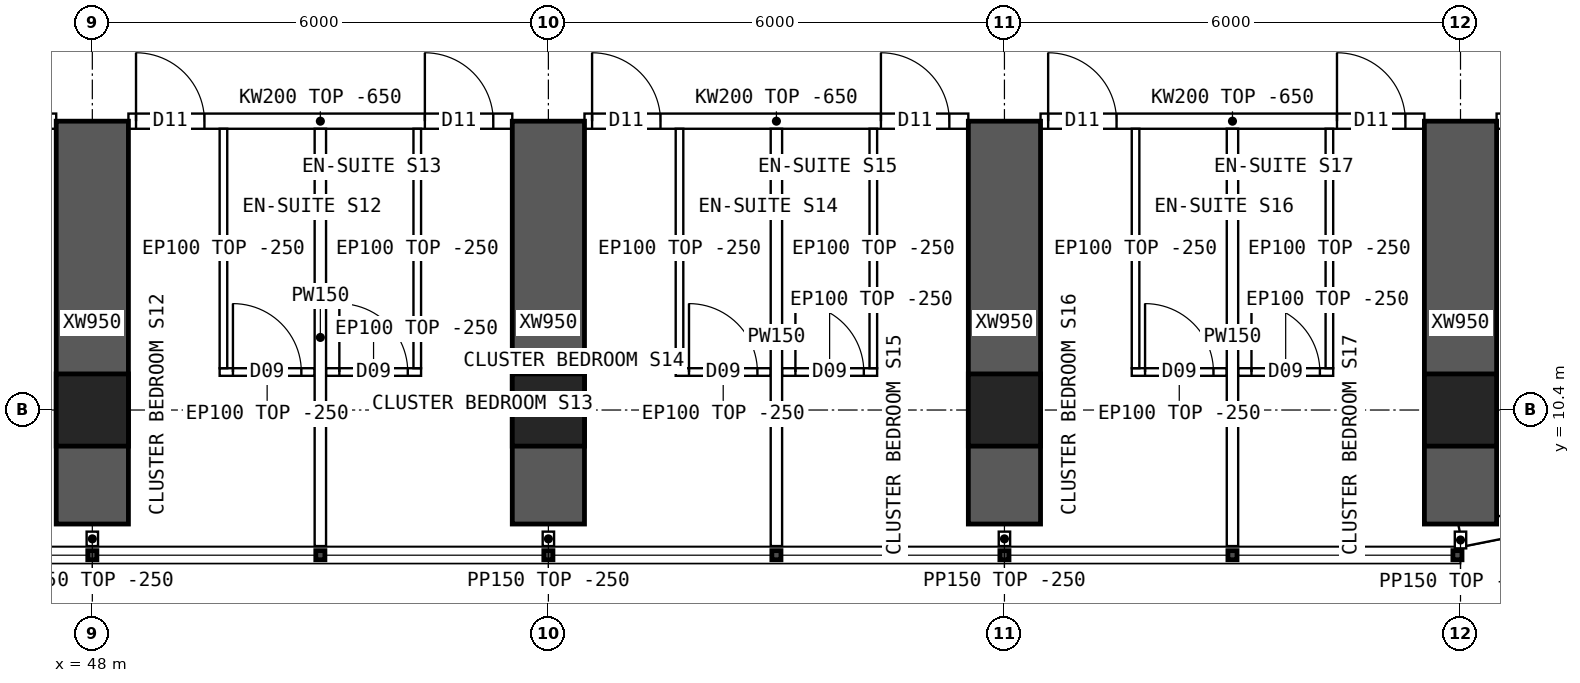
"""IFC4 building model, lengths in metres.
Left out: names, types, materials, properties, quantities, classifications, styles, units other than length and angle.
Written with IfcOpenShell. Run it as: python <this file> out.ifc"""

import sys

from ifc_helpers import new_model, si_unit, direction, frame, frame_2d, origin, origin_2d, place, context, subcontext, project, spatial, polyline, rectangle, hollow_rectangle, outline, extrude, element, fill, save


model = new_model("IFC4")
c1 = context("Model", 3, precision=1e-05, world=origin(), true_north=direction((0.0, 1.0)))
c2 = subcontext(c1, "Body", "Model", "MODEL_VIEW")
j1 = project(units=[si_unit("LENGTHUNIT", "METRE"), si_unit("PLANEANGLEUNIT", "RADIAN")], contexts=[c1])
p1 = place(None, origin())
s1 = spatial("IfcSite", under=j1, at=p1, CompositionType="ELEMENT")
p2 = place(p1, origin())
s2 = spatial("IfcBuilding", under=s1, at=p2, CompositionType="ELEMENT")
p3 = place(p2, frame((0.0, 0.0, 114.4)))
s3 = spatial("IfcBuildingStorey", under=s2, at=p3, CompositionType="ELEMENT", Elevation=114.4)
for number, where, z_axis, x_axis in (
    (1, (48.0, 10.4, 0.0), (0.0, 0.0, 1.0), (1.0, 0.0, 0.0)),
    (2, (54.0, 10.4, 0.0), (0.0, 0.0, 1.0), (1.0, 0.0, 0.0)),
    (3, (60.0, 10.4, 0.0), (0.0, 0.0, 1.0), (1.0, 0.0, 0.0)),
    (4, (66.0, 10.4, 0.0), (0.0, 0.0, 1.0), (1.0, 0.0, 0.0)),
):
    element("IfcColumn", number, at=place(p3, frame(where, z_axis=z_axis, x_axis=x_axis)), inside=s3, PredefinedType="COLUMN", context=c2, shape_type="SweptSolid", body=[
        extrude(hollow_rectangle(XDim=0.95, YDim=0.95, WallThickness=0.095, at=origin_2d()), origin(), (0.0, 0.0, 1.0), 3.75),
    ])
for number, where, z_axis, x_axis in (
    (5, (48.0, 8.9, 0.0), (0.0, 0.0, 1.0), (0.0, 1.0, 0.0)),
    (6, (54.0, 8.9, 0.0), (0.0, 0.0, 1.0), (0.0, 1.0, 0.0)),
    (7, (60.0, 8.9, 0.0), (0.0, 0.0, 1.0), (0.0, 1.0, 0.0)),
    (8, (66.0, 8.9, 0.0), (0.0, 0.0, 1.0), (0.0, 1.0, 0.0)),
):
    element("IfcWall", number, at=place(p3, frame(where, z_axis=z_axis, x_axis=x_axis)), inside=s3, PredefinedType="SHEAR", context=c2, shape_type="SweptSolid", body=[
        extrude(rectangle(XDim=5.3, YDim=0.95, at=frame_2d((2.65, 0.0))), origin(), (0.0, 0.0, 1.0), 3.75),
    ])
p4 = place(p3, frame((66.0, 8.75, 0.0), z_axis=(0.0, 0.0, 1.0), x_axis=(0.980791473772, 0.195059183267, 0.0)))
e9 = element("IfcWall", 9, at=p4, inside=s3, PredefinedType="SOLIDWALL", context=c2, shape_type="SweptSolid", body=[
    extrude(outline(polyline([(-0.03, -0.15), (3.717, -0.15), (3.657, 0.15), (0.03, 0.15), (-0.03, -0.15)])), origin(), (0.0, 0.0, 1.0), 3.5),
])
p5 = place(p4, frame((1.144, 0.0, 0.9)))
e10 = element("IfcOpeningElement", 10, at=p5, cuts=e9, PredefinedType="OPENING", context=c2, shape_type="SweptSolid", body=[
    extrude(rectangle(XDim=1.4, YDim=1.8, at=frame_2d((0.7, 0.9))), frame((0.0, 0.16, 0.0), z_axis=(0.0, -1.0, 0.0), x_axis=(1.0, 0.0, 0.0)), (0.0, 0.0, 1.0), 0.32),
])
p6 = place(p3, frame((42.475, 14.2, 0.0), z_axis=(0.0, 0.0, 1.0), x_axis=(1.0, 0.0, 0.0)))
e11 = element("IfcWall", 11, at=p6, inside=s3, PredefinedType="SOLIDWALL", context=c2, shape_type="SweptSolid", body=[
    extrude(outline(polyline([(0.0, 0.0), (5.05, 0.0), (5.05, 3.1), (0.0, 3.1), (0.0, 0.0)])), frame((0.0, 0.1, 0.0), z_axis=(0.0, -1.0, 0.0), x_axis=(1.0, 0.0, 0.0)), (0.0, 0.0, 1.0), 0.2),
])
p7 = place(p6, frame((0.6, 0.0, 0.0)))
e12 = element("IfcOpeningElement", 12, at=p7, cuts=e11, PredefinedType="OPENING", context=c2, shape_type="SweptSolid", body=[
    extrude(rectangle(XDim=1.0, YDim=2.1, at=frame_2d((0.5, 1.05))), frame((0.0, 0.11, 0.0), z_axis=(0.0, -1.0, 0.0), x_axis=(1.0, 0.0, 0.0)), (0.0, 0.0, 1.0), 0.22),
])
p8 = place(p3, frame((48.475, 14.2, 0.0), z_axis=(0.0, 0.0, 1.0), x_axis=(1.0, 0.0, 0.0)))
e13 = element("IfcWall", 13, at=p8, inside=s3, PredefinedType="SOLIDWALL", context=c2, shape_type="SweptSolid", body=[
    extrude(outline(polyline([(0.0, 0.0), (5.05, 0.0), (5.05, 3.1), (0.0, 3.1), (0.0, 0.0)])), frame((0.0, 0.1, 0.0), z_axis=(0.0, -1.0, 0.0), x_axis=(1.0, 0.0, 0.0)), (0.0, 0.0, 1.0), 0.2),
])
p9 = place(p8, frame((0.1, 0.0, 0.0)))
e14 = element("IfcOpeningElement", 14, at=p9, cuts=e13, PredefinedType="OPENING", context=c2, shape_type="SweptSolid", body=[
    extrude(rectangle(XDim=0.9, YDim=2.1, at=frame_2d((0.45, 1.05))), frame((0.0, 0.11, 0.0), z_axis=(0.0, -1.0, 0.0), x_axis=(1.0, 0.0, 0.0)), (0.0, 0.0, 1.0), 0.22),
])
p10 = place(p8, frame((3.9, 0.0, 0.0)))
e15 = element("IfcOpeningElement", 15, at=p10, cuts=e13, PredefinedType="OPENING", context=c2, shape_type="SweptSolid", body=[
    extrude(rectangle(XDim=0.9, YDim=2.1, at=frame_2d((0.45, 1.05))), frame((0.0, 0.11, 0.0), z_axis=(0.0, -1.0, 0.0), x_axis=(1.0, 0.0, 0.0)), (0.0, 0.0, 1.0), 0.22),
])
p11 = place(p3, frame((54.475, 14.2, 0.0), z_axis=(0.0, 0.0, 1.0), x_axis=(1.0, 0.0, 0.0)))
e16 = element("IfcWall", 16, at=p11, inside=s3, PredefinedType="SOLIDWALL", context=c2, shape_type="SweptSolid", body=[
    extrude(outline(polyline([(0.0, 0.0), (5.05, 0.0), (5.05, 3.1), (0.0, 3.1), (0.0, 0.0)])), frame((0.0, 0.1, 0.0), z_axis=(0.0, -1.0, 0.0), x_axis=(1.0, 0.0, 0.0)), (0.0, 0.0, 1.0), 0.2),
])
p12 = place(p11, frame((0.1, 0.0, 0.0)))
e17 = element("IfcOpeningElement", 17, at=p12, cuts=e16, PredefinedType="OPENING", context=c2, shape_type="SweptSolid", body=[
    extrude(rectangle(XDim=0.9, YDim=2.1, at=frame_2d((0.45, 1.05))), frame((0.0, 0.11, 0.0), z_axis=(0.0, -1.0, 0.0), x_axis=(1.0, 0.0, 0.0)), (0.0, 0.0, 1.0), 0.22),
])
p13 = place(p11, frame((3.9, 0.0, 0.0)))
e18 = element("IfcOpeningElement", 18, at=p13, cuts=e16, PredefinedType="OPENING", context=c2, shape_type="SweptSolid", body=[
    extrude(rectangle(XDim=0.9, YDim=2.1, at=frame_2d((0.45, 1.05))), frame((0.0, 0.11, 0.0), z_axis=(0.0, -1.0, 0.0), x_axis=(1.0, 0.0, 0.0)), (0.0, 0.0, 1.0), 0.22),
])
p14 = place(p3, frame((60.475, 14.2, 0.0), z_axis=(0.0, 0.0, 1.0), x_axis=(1.0, 0.0, 0.0)))
e19 = element("IfcWall", 19, at=p14, inside=s3, PredefinedType="SOLIDWALL", context=c2, shape_type="SweptSolid", body=[
    extrude(outline(polyline([(0.0, 0.0), (5.05, 0.0), (5.05, 3.1), (0.0, 3.1), (0.0, 0.0)])), frame((0.0, 0.1, 0.0), z_axis=(0.0, -1.0, 0.0), x_axis=(1.0, 0.0, 0.0)), (0.0, 0.0, 1.0), 0.2),
])
p15 = place(p14, frame((0.1, 0.0, 0.0)))
e20 = element("IfcOpeningElement", 20, at=p15, cuts=e19, PredefinedType="OPENING", context=c2, shape_type="SweptSolid", body=[
    extrude(rectangle(XDim=0.9, YDim=2.1, at=frame_2d((0.45, 1.05))), frame((0.0, 0.11, 0.0), z_axis=(0.0, -1.0, 0.0), x_axis=(1.0, 0.0, 0.0)), (0.0, 0.0, 1.0), 0.22),
])
p16 = place(p14, frame((3.9, 0.0, 0.0)))
e21 = element("IfcOpeningElement", 21, at=p16, cuts=e19, PredefinedType="OPENING", context=c2, shape_type="SweptSolid", body=[
    extrude(rectangle(XDim=0.9, YDim=2.1, at=frame_2d((0.45, 1.05))), frame((0.0, 0.11, 0.0), z_axis=(0.0, -1.0, 0.0), x_axis=(1.0, 0.0, 0.0)), (0.0, 0.0, 1.0), 0.22),
])
p17 = place(p3, frame((66.475, 14.2, 0.0), z_axis=(0.0, 0.0, 1.0), x_axis=(1.0, 0.0, 0.0)))
e22 = element("IfcWall", 22, at=p17, inside=s3, PredefinedType="SOLIDWALL", context=c2, shape_type="SweptSolid", body=[
    extrude(rectangle(XDim=1.925, YDim=0.2, at=frame_2d((0.962, 0.0))), origin(), (0.0, 0.0, 1.0), 3.5),
])
p18 = place(p17, frame((0.2, 0.0, 0.0)))
e23 = element("IfcOpeningElement", 23, at=p18, cuts=e22, PredefinedType="OPENING", context=c2, shape_type="SweptSolid", body=[
    extrude(rectangle(XDim=0.9, YDim=2.1, at=frame_2d((0.45, 1.05))), frame((0.0, 0.11, 0.0), z_axis=(0.0, -1.0, 0.0), x_axis=(1.0, 0.0, 0.0)), (0.0, 0.0, 1.0), 0.22),
])
p19 = place(p3, frame((51.0, 8.61, 0.0), z_axis=(0.0, 0.0, 1.0), x_axis=(0.0, 1.0, 0.0)))
e24 = element("IfcWall", 24, at=p19, inside=s3, PredefinedType="PARTITIONING", context=c2, shape_type="SweptSolid", body=[
    extrude(outline(polyline([(0.0, 0.0), (5.49, 0.0), (5.49, 3.1), (5.442, 3.1), (5.44, 3.5), (1.992, 3.5), (1.99, 3.1), (1.592, 3.1), (1.59, 3.5), (0.0, 3.5), (0.0, 0.0)])), frame((0.0, 0.075, 0.0), z_axis=(0.0, -1.0, 0.0), x_axis=(1.0, 0.0, 0.0)), (0.0, 0.0, 1.0), 0.15),
])
p20 = place(p3, frame((50.925, 10.9, 0.0), z_axis=(0.0, 0.0, 1.0), x_axis=(-1.0, 0.0, 0.0)))
e25 = element("IfcWall", 25, at=p20, inside=s3, PredefinedType="PARTITIONING", context=c2, shape_type="SweptSolid", body=[
    extrude(rectangle(XDim=1.25, YDim=0.1, at=frame_2d((0.625, 0.0))), origin(), (0.0, 0.0, 1.0), 3.5),
])
p21 = place(p20, frame((0.175, 0.0, 0.0)))
e26 = element("IfcOpeningElement", 26, at=p21, cuts=e25, PredefinedType="OPENING", context=c2, shape_type="SweptSolid", body=[
    extrude(rectangle(XDim=0.9, YDim=2.1, at=frame_2d((0.45, 1.05))), frame((0.0, 0.06, 0.0), z_axis=(0.0, -1.0, 0.0), x_axis=(1.0, 0.0, 0.0)), (0.0, 0.0, 1.0), 0.12),
])
p22 = place(p3, frame((49.725, 10.95, 0.0), z_axis=(0.0, 0.0, 1.0), x_axis=(0.0, 1.0, 0.0)))
e27 = element("IfcWall", 27, at=p22, inside=s3, PredefinedType="PARTITIONING", context=c2, shape_type="SweptSolid", body=[
    extrude(outline(polyline([(0.0, 0.0), (3.15, 0.0), (3.15, 3.1), (3.102, 3.1), (3.1, 3.5), (0.0, 3.5), (0.0, 0.0)])), frame((0.0, 0.05, 0.0), z_axis=(0.0, -1.0, 0.0), x_axis=(1.0, 0.0, 0.0)), (0.0, 0.0, 1.0), 0.1),
])
p23 = place(p3, frame((52.325, 10.9, 0.0), z_axis=(0.0, 0.0, 1.0), x_axis=(-1.0, 0.0, 0.0)))
e28 = element("IfcWall", 28, at=p23, inside=s3, PredefinedType="PARTITIONING", context=c2, shape_type="SweptSolid", body=[
    extrude(rectangle(XDim=1.25, YDim=0.1, at=frame_2d((0.625, 0.0))), origin(), (0.0, 0.0, 1.0), 3.5),
])
p24 = place(p23, frame((0.175, 0.0, 0.0)))
e29 = element("IfcOpeningElement", 29, at=p24, cuts=e28, PredefinedType="OPENING", context=c2, shape_type="SweptSolid", body=[
    extrude(rectangle(XDim=0.9, YDim=2.1, at=frame_2d((0.45, 1.05))), frame((0.0, 0.06, 0.0), z_axis=(0.0, -1.0, 0.0), x_axis=(1.0, 0.0, 0.0)), (0.0, 0.0, 1.0), 0.12),
])
p25 = place(p3, frame((52.275, 10.95, 0.0), z_axis=(0.0, 0.0, 1.0), x_axis=(0.0, 1.0, 0.0)))
e30 = element("IfcWall", 30, at=p25, inside=s3, PredefinedType="PARTITIONING", context=c2, shape_type="SweptSolid", body=[
    extrude(outline(polyline([(0.0, 0.0), (3.15, 0.0), (3.15, 3.1), (3.102, 3.1), (3.1, 3.5), (0.0, 3.5), (0.0, 0.0)])), frame((0.0, 0.05, 0.0), z_axis=(0.0, -1.0, 0.0), x_axis=(1.0, 0.0, 0.0)), (0.0, 0.0, 1.0), 0.1),
])
p26 = place(p3, frame((57.0, 8.61, 0.0), z_axis=(0.0, 0.0, 1.0), x_axis=(0.0, 1.0, 0.0)))
e31 = element("IfcWall", 31, at=p26, inside=s3, PredefinedType="PARTITIONING", context=c2, shape_type="SweptSolid", body=[
    extrude(outline(polyline([(0.0, 0.0), (5.49, 0.0), (5.49, 3.1), (5.442, 3.1), (5.44, 3.5), (1.992, 3.5), (1.99, 3.1), (1.592, 3.1), (1.59, 3.5), (0.0, 3.5), (0.0, 0.0)])), frame((0.0, 0.075, 0.0), z_axis=(0.0, -1.0, 0.0), x_axis=(1.0, 0.0, 0.0)), (0.0, 0.0, 1.0), 0.15),
])
p27 = place(p3, frame((56.925, 10.9, 0.0), z_axis=(0.0, 0.0, 1.0), x_axis=(-1.0, 0.0, 0.0)))
e32 = element("IfcWall", 32, at=p27, inside=s3, PredefinedType="PARTITIONING", context=c2, shape_type="SweptSolid", body=[
    extrude(rectangle(XDim=1.25, YDim=0.1, at=frame_2d((0.625, 0.0))), origin(), (0.0, 0.0, 1.0), 3.5),
])
p28 = place(p27, frame((0.175, 0.0, 0.0)))
e33 = element("IfcOpeningElement", 33, at=p28, cuts=e32, PredefinedType="OPENING", context=c2, shape_type="SweptSolid", body=[
    extrude(rectangle(XDim=0.9, YDim=2.1, at=frame_2d((0.45, 1.05))), frame((0.0, 0.06, 0.0), z_axis=(0.0, -1.0, 0.0), x_axis=(1.0, 0.0, 0.0)), (0.0, 0.0, 1.0), 0.12),
])
p29 = place(p3, frame((55.725, 10.95, 0.0), z_axis=(0.0, 0.0, 1.0), x_axis=(0.0, 1.0, 0.0)))
e34 = element("IfcWall", 34, at=p29, inside=s3, PredefinedType="PARTITIONING", context=c2, shape_type="SweptSolid", body=[
    extrude(outline(polyline([(0.0, 0.0), (3.15, 0.0), (3.15, 3.1), (3.102, 3.1), (3.1, 3.5), (0.0, 3.5), (0.0, 0.0)])), frame((0.0, 0.05, 0.0), z_axis=(0.0, -1.0, 0.0), x_axis=(1.0, 0.0, 0.0)), (0.0, 0.0, 1.0), 0.1),
])
p30 = place(p3, frame((58.325, 10.9, 0.0), z_axis=(0.0, 0.0, 1.0), x_axis=(-1.0, 0.0, 0.0)))
e35 = element("IfcWall", 35, at=p30, inside=s3, PredefinedType="PARTITIONING", context=c2, shape_type="SweptSolid", body=[
    extrude(rectangle(XDim=1.25, YDim=0.1, at=frame_2d((0.625, 0.0))), origin(), (0.0, 0.0, 1.0), 3.5),
])
p31 = place(p30, frame((0.175, 0.0, 0.0)))
e36 = element("IfcOpeningElement", 36, at=p31, cuts=e35, PredefinedType="OPENING", context=c2, shape_type="SweptSolid", body=[
    extrude(rectangle(XDim=0.9, YDim=2.1, at=frame_2d((0.45, 1.05))), frame((0.0, 0.06, 0.0), z_axis=(0.0, -1.0, 0.0), x_axis=(1.0, 0.0, 0.0)), (0.0, 0.0, 1.0), 0.12),
])
p32 = place(p3, frame((58.275, 10.95, 0.0), z_axis=(0.0, 0.0, 1.0), x_axis=(0.0, 1.0, 0.0)))
e37 = element("IfcWall", 37, at=p32, inside=s3, PredefinedType="PARTITIONING", context=c2, shape_type="SweptSolid", body=[
    extrude(outline(polyline([(0.0, 0.0), (3.15, 0.0), (3.15, 3.1), (3.102, 3.1), (3.1, 3.5), (0.0, 3.5), (0.0, 0.0)])), frame((0.0, 0.05, 0.0), z_axis=(0.0, -1.0, 0.0), x_axis=(1.0, 0.0, 0.0)), (0.0, 0.0, 1.0), 0.1),
])
p33 = place(p3, frame((63.0, 8.61, 0.0), z_axis=(0.0, 0.0, 1.0), x_axis=(0.0, 1.0, 0.0)))
e38 = element("IfcWall", 38, at=p33, inside=s3, PredefinedType="PARTITIONING", context=c2, shape_type="SweptSolid", body=[
    extrude(outline(polyline([(0.0, 0.0), (5.49, 0.0), (5.49, 3.1), (5.442, 3.1), (5.44, 3.5), (1.992, 3.5), (1.99, 3.1), (1.592, 3.1), (1.59, 3.5), (0.0, 3.5), (0.0, 0.0)])), frame((0.0, 0.075, 0.0), z_axis=(0.0, -1.0, 0.0), x_axis=(1.0, 0.0, 0.0)), (0.0, 0.0, 1.0), 0.15),
])
p34 = place(p3, frame((62.925, 10.9, 0.0), z_axis=(0.0, 0.0, 1.0), x_axis=(-1.0, 0.0, 0.0)))
e39 = element("IfcWall", 39, at=p34, inside=s3, PredefinedType="PARTITIONING", context=c2, shape_type="SweptSolid", body=[
    extrude(rectangle(XDim=1.25, YDim=0.1, at=frame_2d((0.625, 0.0))), origin(), (0.0, 0.0, 1.0), 3.5),
])
p35 = place(p34, frame((0.175, 0.0, 0.0)))
e40 = element("IfcOpeningElement", 40, at=p35, cuts=e39, PredefinedType="OPENING", context=c2, shape_type="SweptSolid", body=[
    extrude(rectangle(XDim=0.9, YDim=2.1, at=frame_2d((0.45, 1.05))), frame((0.0, 0.06, 0.0), z_axis=(0.0, -1.0, 0.0), x_axis=(1.0, 0.0, 0.0)), (0.0, 0.0, 1.0), 0.12),
])
p36 = place(p3, frame((61.725, 10.95, 0.0), z_axis=(0.0, 0.0, 1.0), x_axis=(0.0, 1.0, 0.0)))
e41 = element("IfcWall", 41, at=p36, inside=s3, PredefinedType="PARTITIONING", context=c2, shape_type="SweptSolid", body=[
    extrude(outline(polyline([(0.0, 0.0), (3.15, 0.0), (3.15, 3.1), (3.102, 3.1), (3.1, 3.5), (0.0, 3.5), (0.0, 0.0)])), frame((0.0, 0.05, 0.0), z_axis=(0.0, -1.0, 0.0), x_axis=(1.0, 0.0, 0.0)), (0.0, 0.0, 1.0), 0.1),
])
p37 = place(p3, frame((64.325, 10.9, 0.0), z_axis=(0.0, 0.0, 1.0), x_axis=(-1.0, 0.0, 0.0)))
e42 = element("IfcWall", 42, at=p37, inside=s3, PredefinedType="PARTITIONING", context=c2, shape_type="SweptSolid", body=[
    extrude(rectangle(XDim=1.25, YDim=0.1, at=frame_2d((0.625, 0.0))), origin(), (0.0, 0.0, 1.0), 3.5),
])
p38 = place(p37, frame((0.175, 0.0, 0.0)))
e43 = element("IfcOpeningElement", 43, at=p38, cuts=e42, PredefinedType="OPENING", context=c2, shape_type="SweptSolid", body=[
    extrude(rectangle(XDim=0.9, YDim=2.1, at=frame_2d((0.45, 1.05))), frame((0.0, 0.06, 0.0), z_axis=(0.0, -1.0, 0.0), x_axis=(1.0, 0.0, 0.0)), (0.0, 0.0, 1.0), 0.12),
])
p39 = place(p3, frame((64.275, 10.95, 0.0), z_axis=(0.0, 0.0, 1.0), x_axis=(0.0, 1.0, 0.0)))
e44 = element("IfcWall", 44, at=p39, inside=s3, PredefinedType="PARTITIONING", context=c2, shape_type="SweptSolid", body=[
    extrude(outline(polyline([(0.0, 0.0), (3.15, 0.0), (3.15, 3.1), (3.102, 3.1), (3.1, 3.5), (0.0, 3.5), (0.0, 0.0)])), frame((0.0, 0.05, 0.0), z_axis=(0.0, -1.0, 0.0), x_axis=(1.0, 0.0, 0.0)), (0.0, 0.0, 1.0), 0.1),
])
for number, where, z_axis, x_axis in (
    (45, (48.0, 8.8, 0.0), (0.0, 0.0, 1.0), (0.0, -1.0, 0.0)),
    (46, (54.0, 8.8, 0.0), (0.0, 0.0, 1.0), (0.0, -1.0, 0.0)),
    (47, (60.0, 8.8, 0.0), (0.0, 0.0, 1.0), (0.0, -1.0, 0.0)),
):
    element("IfcWall", number, at=place(p3, frame(where, z_axis=z_axis, x_axis=x_axis)), inside=s3, PredefinedType="PARTITIONING", context=c2, shape_type="SweptSolid", body=[
        extrude(rectangle(XDim=0.19, YDim=0.15, at=frame_2d((0.095, 0.0))), origin(), (0.0, 0.0, 1.0), 3.5),
    ])
p40 = place(p3, frame((66.0, 8.8, 0.0), z_axis=(0.0, 0.0, 1.0), x_axis=(0.0, -1.0, 0.0)))
e48 = element("IfcWall", 48, at=p40, inside=s3, PredefinedType="PARTITIONING", context=c2, shape_type="SweptSolid", body=[
    extrude(rectangle(XDim=0.22, YDim=0.15, at=frame_2d((0.11, 0.0))), origin(), (0.0, 0.0, 1.0), 3.5),
])
p41 = place(p21, origin())
e49 = element("IfcDoor", 49, at=p41, inside=s3, OperationType="SINGLE_SWING_RIGHT", PredefinedType="DOOR", context=c2, shape_type="SweptSolid", body=[
    extrude(rectangle(XDim=0.9, YDim=2.1, at=frame_2d((0.45, 1.05))), frame((0.0, 0.025, 0.0), z_axis=(0.0, -1.0, 0.0), x_axis=(1.0, 0.0, 0.0)), (0.0, 0.0, 1.0), 0.05),
])
fill(e26, e49)
p42 = place(p9, origin())
e50 = element("IfcDoor", 50, at=p42, inside=s3, OperationType="SINGLE_SWING_LEFT", PredefinedType="DOOR", context=c2, shape_type="SweptSolid", body=[
    extrude(rectangle(XDim=0.9, YDim=2.1, at=frame_2d((0.45, 1.05))), frame((0.0, 0.025, 0.0), z_axis=(0.0, -1.0, 0.0), x_axis=(1.0, 0.0, 0.0)), (0.0, 0.0, 1.0), 0.05),
])
fill(e14, e50)
p43 = place(p24, origin())
e51 = element("IfcDoor", 51, at=p43, inside=s3, OperationType="SINGLE_SWING_RIGHT", PredefinedType="DOOR", context=c2, shape_type="SweptSolid", body=[
    extrude(rectangle(XDim=0.9, YDim=2.1, at=frame_2d((0.45, 1.05))), frame((0.0, 0.025, 0.0), z_axis=(0.0, -1.0, 0.0), x_axis=(1.0, 0.0, 0.0)), (0.0, 0.0, 1.0), 0.05),
])
fill(e29, e51)
p44 = place(p10, origin())
e52 = element("IfcDoor", 52, at=p44, inside=s3, OperationType="SINGLE_SWING_LEFT", PredefinedType="DOOR", context=c2, shape_type="SweptSolid", body=[
    extrude(rectangle(XDim=0.9, YDim=2.1, at=frame_2d((0.45, 1.05))), frame((0.0, 0.025, 0.0), z_axis=(0.0, -1.0, 0.0), x_axis=(1.0, 0.0, 0.0)), (0.0, 0.0, 1.0), 0.05),
])
fill(e15, e52)
p45 = place(p28, origin())
e53 = element("IfcDoor", 53, at=p45, inside=s3, OperationType="SINGLE_SWING_RIGHT", PredefinedType="DOOR", context=c2, shape_type="SweptSolid", body=[
    extrude(rectangle(XDim=0.9, YDim=2.1, at=frame_2d((0.45, 1.05))), frame((0.0, 0.025, 0.0), z_axis=(0.0, -1.0, 0.0), x_axis=(1.0, 0.0, 0.0)), (0.0, 0.0, 1.0), 0.05),
])
fill(e33, e53)
p46 = place(p12, origin())
e54 = element("IfcDoor", 54, at=p46, inside=s3, OperationType="SINGLE_SWING_LEFT", PredefinedType="DOOR", context=c2, shape_type="SweptSolid", body=[
    extrude(rectangle(XDim=0.9, YDim=2.1, at=frame_2d((0.45, 1.05))), frame((0.0, 0.025, 0.0), z_axis=(0.0, -1.0, 0.0), x_axis=(1.0, 0.0, 0.0)), (0.0, 0.0, 1.0), 0.05),
])
fill(e17, e54)
p47 = place(p31, origin())
e55 = element("IfcDoor", 55, at=p47, inside=s3, OperationType="SINGLE_SWING_RIGHT", PredefinedType="DOOR", context=c2, shape_type="SweptSolid", body=[
    extrude(rectangle(XDim=0.9, YDim=2.1, at=frame_2d((0.45, 1.05))), frame((0.0, 0.025, 0.0), z_axis=(0.0, -1.0, 0.0), x_axis=(1.0, 0.0, 0.0)), (0.0, 0.0, 1.0), 0.05),
])
fill(e36, e55)
p48 = place(p13, origin())
e56 = element("IfcDoor", 56, at=p48, inside=s3, OperationType="SINGLE_SWING_LEFT", PredefinedType="DOOR", context=c2, shape_type="SweptSolid", body=[
    extrude(rectangle(XDim=0.9, YDim=2.1, at=frame_2d((0.45, 1.05))), frame((0.0, 0.025, 0.0), z_axis=(0.0, -1.0, 0.0), x_axis=(1.0, 0.0, 0.0)), (0.0, 0.0, 1.0), 0.05),
])
fill(e18, e56)
p49 = place(p35, origin())
e57 = element("IfcDoor", 57, at=p49, inside=s3, OperationType="SINGLE_SWING_RIGHT", PredefinedType="DOOR", context=c2, shape_type="SweptSolid", body=[
    extrude(rectangle(XDim=0.9, YDim=2.1, at=frame_2d((0.45, 1.05))), frame((0.0, 0.025, 0.0), z_axis=(0.0, -1.0, 0.0), x_axis=(1.0, 0.0, 0.0)), (0.0, 0.0, 1.0), 0.05),
])
fill(e40, e57)
p50 = place(p15, origin())
e58 = element("IfcDoor", 58, at=p50, inside=s3, OperationType="SINGLE_SWING_LEFT", PredefinedType="DOOR", context=c2, shape_type="SweptSolid", body=[
    extrude(rectangle(XDim=0.9, YDim=2.1, at=frame_2d((0.45, 1.05))), frame((0.0, 0.025, 0.0), z_axis=(0.0, -1.0, 0.0), x_axis=(1.0, 0.0, 0.0)), (0.0, 0.0, 1.0), 0.05),
])
fill(e20, e58)
p51 = place(p38, origin())
e59 = element("IfcDoor", 59, at=p51, inside=s3, OperationType="SINGLE_SWING_RIGHT", PredefinedType="DOOR", context=c2, shape_type="SweptSolid", body=[
    extrude(rectangle(XDim=0.9, YDim=2.1, at=frame_2d((0.45, 1.05))), frame((0.0, 0.025, 0.0), z_axis=(0.0, -1.0, 0.0), x_axis=(1.0, 0.0, 0.0)), (0.0, 0.0, 1.0), 0.05),
])
fill(e43, e59)
p52 = place(p16, origin())
e60 = element("IfcDoor", 60, at=p52, inside=s3, OperationType="SINGLE_SWING_LEFT", PredefinedType="DOOR", context=c2, shape_type="SweptSolid", body=[
    extrude(rectangle(XDim=0.9, YDim=2.1, at=frame_2d((0.45, 1.05))), frame((0.0, 0.025, 0.0), z_axis=(0.0, -1.0, 0.0), x_axis=(1.0, 0.0, 0.0)), (0.0, 0.0, 1.0), 0.05),
])
fill(e21, e60)
save(model, sys.argv[1])
